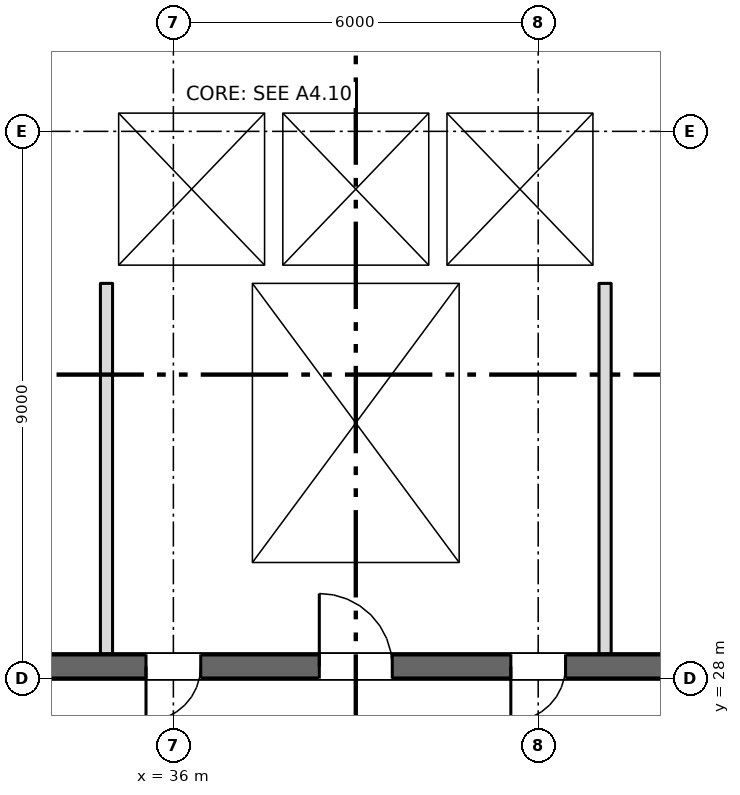
"""IFC4 building model, lengths in metres.
Left out: names, types, materials, properties, quantities, classifications, styles, units other than length and angle.
Written with IfcOpenShell. Run it as: python <this file> out.ifc"""

import sys

from ifc_helpers import new_model, si_unit, direction, frame, frame_2d, origin, place, context, subcontext, project, spatial, rectangle, extrude, element, fill, save


model = new_model("IFC4")
c1 = context("Model", 3, precision=1e-05, world=origin(), true_north=direction((0.0, 1.0)))
c2 = subcontext(c1, "Body", "Model", "MODEL_VIEW")
j1 = project(units=[si_unit("LENGTHUNIT", "METRE"), si_unit("PLANEANGLEUNIT", "RADIAN")], contexts=[c1])
p1 = place(None, origin())
s1 = spatial("IfcSite", under=j1, at=p1, CompositionType="ELEMENT")
p2 = place(p1, origin())
s2 = spatial("IfcBuilding", under=s1, at=p2, CompositionType="ELEMENT")
p3 = place(p2, frame((0.0, 0.0, 52.5)))
s3 = spatial("IfcBuildingStorey", under=s2, at=p3, CompositionType="ELEMENT", Elevation=52.5)
p4 = place(p3, frame((6.7, 28.2, 0.0), z_axis=(0.0, 0.0, 1.0), x_axis=(1.0, 0.0, 0.0)))
e1 = element("IfcWall", 1, at=p4, inside=s3, PredefinedType="SHEAR", context=c2, shape_type="SweptSolid", body=[
    extrude(rectangle(XDim=57.8, YDim=0.4, at=frame_2d((28.9, 0.0))), origin(), (0.0, 0.0, 1.0), 3.35),
])
p5 = place(p4, frame((13.85, 0.0, 0.0)))
e2 = element("IfcOpeningElement", 2, at=p5, cuts=e1, PredefinedType="OPENING", context=c2, shape_type="SweptSolid", body=[
    extrude(rectangle(XDim=0.9, YDim=2.1, at=frame_2d((0.45, 1.05))), frame((0.0, 0.21, 0.0), z_axis=(0.0, -1.0, 0.0), x_axis=(1.0, 0.0, 0.0)), (0.0, 0.0, 1.0), 0.42),
])
p6 = place(p4, frame((48.562, 0.0, 0.0)))
e3 = element("IfcOpeningElement", 3, at=p6, cuts=e1, PredefinedType="OPENING", context=c2, shape_type="SweptSolid", body=[
    extrude(rectangle(XDim=0.9, YDim=2.1, at=frame_2d((0.45, 1.05))), frame((0.0, 0.21, 0.0), z_axis=(0.0, -1.0, 0.0), x_axis=(1.0, 0.0, 0.0)), (0.0, 0.0, 1.0), 0.42),
])
p7 = place(p4, frame((51.137, 0.0, 0.0)))
e4 = element("IfcOpeningElement", 4, at=p7, cuts=e1, PredefinedType="OPENING", context=c2, shape_type="SweptSolid", body=[
    extrude(rectangle(XDim=0.9, YDim=2.1, at=frame_2d((0.45, 1.05))), frame((0.0, 0.21, 0.0), z_axis=(0.0, -1.0, 0.0), x_axis=(1.0, 0.0, 0.0)), (0.0, 0.0, 1.0), 0.42),
])
p8 = place(p4, frame((1.35, 0.0, 0.0)))
e5 = element("IfcOpeningElement", 5, at=p8, cuts=e1, PredefinedType="OPENING", context=c2, shape_type="SweptSolid", body=[
    extrude(rectangle(XDim=0.9, YDim=2.1, at=frame_2d((0.45, 1.05))), frame((0.0, 0.21, 0.0), z_axis=(0.0, -1.0, 0.0), x_axis=(1.0, 0.0, 0.0)), (0.0, 0.0, 1.0), 0.42),
])
p9 = place(p4, frame((4.7, 0.0, 0.0)))
e6 = element("IfcOpeningElement", 6, at=p9, cuts=e1, PredefinedType="OPENING", context=c2, shape_type="SweptSolid", body=[
    extrude(rectangle(XDim=1.2, YDim=2.1, at=frame_2d((0.6, 1.05))), frame((0.0, 0.21, 0.0), z_axis=(0.0, -1.0, 0.0), x_axis=(1.0, 0.0, 0.0)), (0.0, 0.0, 1.0), 0.42),
])
p10 = place(p4, frame((31.7, 0.0, 0.0)))
e7 = element("IfcOpeningElement", 7, at=p10, cuts=e1, PredefinedType="OPENING", context=c2, shape_type="SweptSolid", body=[
    extrude(rectangle(XDim=1.2, YDim=2.1, at=frame_2d((0.6, 1.05))), frame((0.0, 0.21, 0.0), z_axis=(0.0, -1.0, 0.0), x_axis=(1.0, 0.0, 0.0)), (0.0, 0.0, 1.0), 0.42),
])
p11 = place(p4, frame((55.2, 0.0, 0.0)))
e8 = element("IfcOpeningElement", 8, at=p11, cuts=e1, PredefinedType="OPENING", context=c2, shape_type="SweptSolid", body=[
    extrude(rectangle(XDim=1.2, YDim=2.1, at=frame_2d((0.6, 1.05))), frame((0.0, 0.21, 0.0), z_axis=(0.0, -1.0, 0.0), x_axis=(1.0, 0.0, 0.0)), (0.0, 0.0, 1.0), 0.42),
])
p12 = place(p4, frame((21.7, 0.0, 0.0)))
e9 = element("IfcOpeningElement", 9, at=p12, cuts=e1, PredefinedType="OPENING", context=c2, shape_type="SweptSolid", body=[
    extrude(rectangle(XDim=1.2, YDim=2.1, at=frame_2d((0.6, 1.05))), frame((0.0, 0.21, 0.0), z_axis=(0.0, -1.0, 0.0), x_axis=(1.0, 0.0, 0.0)), (0.0, 0.0, 1.0), 0.42),
])
p13 = place(p4, frame((41.7, 0.0, 0.0)))
e10 = element("IfcOpeningElement", 10, at=p13, cuts=e1, PredefinedType="OPENING", context=c2, shape_type="SweptSolid", body=[
    extrude(rectangle(XDim=1.2, YDim=2.1, at=frame_2d((0.6, 1.05))), frame((0.0, 0.21, 0.0), z_axis=(0.0, -1.0, 0.0), x_axis=(1.0, 0.0, 0.0)), (0.0, 0.0, 1.0), 0.42),
])
p14 = place(p4, frame((24.85, 0.0, 0.0)))
e11 = element("IfcOpeningElement", 11, at=p14, cuts=e1, PredefinedType="OPENING", context=c2, shape_type="SweptSolid", body=[
    extrude(rectangle(XDim=2.4, YDim=2.1, at=frame_2d((1.2, 1.05))), frame((0.0, 0.21, 0.0), z_axis=(0.0, -1.0, 0.0), x_axis=(1.0, 0.0, 0.0)), (0.0, 0.0, 1.0), 0.42),
])
p15 = place(p4, frame((37.35, 0.0, 0.0)))
e12 = element("IfcOpeningElement", 12, at=p15, cuts=e1, PredefinedType="OPENING", context=c2, shape_type="SweptSolid", body=[
    extrude(rectangle(XDim=2.4, YDim=2.1, at=frame_2d((1.2, 1.05))), frame((0.0, 0.21, 0.0), z_axis=(0.0, -1.0, 0.0), x_axis=(1.0, 0.0, 0.0)), (0.0, 0.0, 1.0), 0.42),
])
p16 = place(p4, frame((7.85, 0.0, 0.0)))
e13 = element("IfcOpeningElement", 13, at=p16, cuts=e1, PredefinedType="OPENING", context=c2, shape_type="SweptSolid", body=[
    extrude(rectangle(XDim=2.4, YDim=2.1, at=frame_2d((1.2, 1.05))), frame((0.0, 0.21, 0.0), z_axis=(0.0, -1.0, 0.0), x_axis=(1.0, 0.0, 0.0)), (0.0, 0.0, 1.0), 0.42),
])
p17 = place(p4, frame((28.85, 0.0, 0.0)))
e14 = element("IfcOpeningElement", 14, at=p17, cuts=e1, PredefinedType="OPENING", context=c2, shape_type="SweptSolid", body=[
    extrude(rectangle(XDim=0.9, YDim=2.1, at=frame_2d((0.45, 1.05))), frame((0.0, 0.21, 0.0), z_axis=(0.0, -1.0, 0.0), x_axis=(1.0, 0.0, 0.0)), (0.0, 0.0, 1.0), 0.42),
])
p18 = place(p4, frame((34.85, 0.0, 0.0)))
e15 = element("IfcOpeningElement", 15, at=p18, cuts=e1, PredefinedType="OPENING", context=c2, shape_type="SweptSolid", body=[
    extrude(rectangle(XDim=0.9, YDim=2.1, at=frame_2d((0.45, 1.05))), frame((0.0, 0.21, 0.0), z_axis=(0.0, -1.0, 0.0), x_axis=(1.0, 0.0, 0.0)), (0.0, 0.0, 1.0), 0.42),
])
for number, where, z_axis, x_axis in (
    (16, (37.15, 28.4, 0.0), (0.0, 0.0, 1.0), (0.0, 1.0, 0.0)),
    (17, (40.85, 28.4, 0.0), (0.0, 0.0, 1.0), (0.0, 1.0, 0.0)),
):
    element("IfcWall", number, at=place(p3, frame(where, z_axis=z_axis, x_axis=x_axis)), inside=s3, PredefinedType="SHEAR", context=c2, shape_type="SweptSolid", body=[
        extrude(rectangle(XDim=6.1, YDim=0.3, at=frame_2d((3.05, 0.0))), origin(), (0.0, 0.0, 1.0), 3.35),
    ])
p19 = place(p3, frame((34.8, 34.65, 0.0), z_axis=(0.0, 0.0, 1.0), x_axis=(1.0, 0.0, 0.0)))
e18 = element("IfcWall", 18, at=p19, inside=s3, PredefinedType="SHEAR", context=c2, shape_type="SweptSolid", body=[
    extrude(rectangle(XDim=8.4, YDim=0.3, at=frame_2d((4.2, 0.0))), origin(), (0.0, 0.0, 1.0), 3.35),
])
p20 = place(p3, frame((34.8, 37.45, 0.0), z_axis=(0.0, 0.0, 1.0), x_axis=(1.0, 0.0, 0.0)))
e19 = element("IfcWall", 19, at=p20, inside=s3, PredefinedType="SHEAR", context=c2, shape_type="SweptSolid", body=[
    extrude(rectangle(XDim=8.4, YDim=0.3, at=frame_2d((4.2, 0.0))), origin(), (0.0, 0.0, 1.0), 3.35),
])
p21 = place(p20, frame((0.95, 0.0, 0.0)))
e20 = element("IfcOpeningElement", 20, at=p21, cuts=e19, PredefinedType="OPENING", context=c2, shape_type="SweptSolid", body=[
    extrude(rectangle(XDim=1.1, YDim=2.1, at=frame_2d((0.55, 1.05))), frame((0.0, 0.16, 0.0), z_axis=(0.0, -1.0, 0.0), x_axis=(1.0, 0.0, 0.0)), (0.0, 0.0, 1.0), 0.32),
])
p22 = place(p20, frame((3.65, 0.0, 0.0)))
e21 = element("IfcOpeningElement", 21, at=p22, cuts=e19, PredefinedType="OPENING", context=c2, shape_type="SweptSolid", body=[
    extrude(rectangle(XDim=1.1, YDim=2.1, at=frame_2d((0.55, 1.05))), frame((0.0, 0.16, 0.0), z_axis=(0.0, -1.0, 0.0), x_axis=(1.0, 0.0, 0.0)), (0.0, 0.0, 1.0), 0.32),
])
p23 = place(p20, frame((6.35, 0.0, 0.0)))
e22 = element("IfcOpeningElement", 22, at=p23, cuts=e19, PredefinedType="OPENING", context=c2, shape_type="SweptSolid", body=[
    extrude(rectangle(XDim=1.1, YDim=2.1, at=frame_2d((0.55, 1.05))), frame((0.0, 0.16, 0.0), z_axis=(0.0, -1.0, 0.0), x_axis=(1.0, 0.0, 0.0)), (0.0, 0.0, 1.0), 0.32),
])
for number, where, z_axis, x_axis in (
    (23, (34.95, 34.8, 0.0), (0.0, 0.0, 1.0), (0.0, 1.0, 0.0)),
    (24, (43.05, 34.8, 0.0), (0.0, 0.0, 1.0), (0.0, 1.0, 0.0)),
    (25, (37.65, 34.8, 0.0), (0.0, 0.0, 1.0), (0.0, 1.0, 0.0)),
    (26, (40.35, 34.8, 0.0), (0.0, 0.0, 1.0), (0.0, 1.0, 0.0)),
):
    element("IfcWall", number, at=place(p3, frame(where, z_axis=z_axis, x_axis=x_axis)), inside=s3, PredefinedType="SHEAR", context=c2, shape_type="SweptSolid", body=[
        extrude(rectangle(XDim=2.5, YDim=0.3, at=frame_2d((1.25, 0.0))), origin(), (0.0, 0.0, 1.0), 3.35),
    ])
for number, where, z_axis, x_axis in (
    (27, (34.9, 28.4, 0.0), (0.0, 0.0, 1.0), (0.0, 1.0, 0.0)),
    (28, (43.1, 28.4, 0.0), (0.0, 0.0, 1.0), (0.0, 1.0, 0.0)),
):
    element("IfcWall", number, at=place(p3, frame(where, z_axis=z_axis, x_axis=x_axis)), inside=s3, PredefinedType="PARTITIONING", context=c2, shape_type="SweptSolid", body=[
        extrude(rectangle(XDim=6.1, YDim=0.2, at=frame_2d((3.05, 0.0))), origin(), (0.0, 0.0, 1.0), 3.35),
    ])
p24 = place(p21, origin())
e29 = element("IfcDoor", 29, at=p24, inside=s3, OperationType="SLIDING_TO_LEFT", PredefinedType="DOOR", context=c2, shape_type="SweptSolid", body=[
    extrude(rectangle(XDim=1.1, YDim=2.1, at=frame_2d((0.55, 1.05))), frame((0.0, 0.025, 0.0), z_axis=(0.0, -1.0, 0.0), x_axis=(1.0, 0.0, 0.0)), (0.0, 0.0, 1.0), 0.05),
])
fill(e20, e29)
p25 = place(p22, origin())
e30 = element("IfcDoor", 30, at=p25, inside=s3, OperationType="SLIDING_TO_LEFT", PredefinedType="DOOR", context=c2, shape_type="SweptSolid", body=[
    extrude(rectangle(XDim=1.1, YDim=2.1, at=frame_2d((0.55, 1.05))), frame((0.0, 0.025, 0.0), z_axis=(0.0, -1.0, 0.0), x_axis=(1.0, 0.0, 0.0)), (0.0, 0.0, 1.0), 0.05),
])
fill(e21, e30)
p26 = place(p23, origin())
e31 = element("IfcDoor", 31, at=p26, inside=s3, OperationType="SLIDING_TO_LEFT", PredefinedType="DOOR", context=c2, shape_type="SweptSolid", body=[
    extrude(rectangle(XDim=1.1, YDim=2.1, at=frame_2d((0.55, 1.05))), frame((0.0, 0.025, 0.0), z_axis=(0.0, -1.0, 0.0), x_axis=(1.0, 0.0, 0.0)), (0.0, 0.0, 1.0), 0.05),
])
fill(e22, e31)
p27 = place(p10, origin())
e32 = element("IfcDoor", 32, at=p27, inside=s3, OperationType="SINGLE_SWING_LEFT", PredefinedType="DOOR", context=c2, shape_type="SweptSolid", body=[
    extrude(rectangle(XDim=1.2, YDim=2.1, at=frame_2d((0.6, 1.05))), frame((0.0, 0.025, 0.0), z_axis=(0.0, -1.0, 0.0), x_axis=(1.0, 0.0, 0.0)), (0.0, 0.0, 1.0), 0.05),
])
fill(e7, e32)
p28 = place(p17, origin())
e33 = element("IfcDoor", 33, at=p28, inside=s3, OperationType="SINGLE_SWING_LEFT", PredefinedType="DOOR", context=c2, shape_type="SweptSolid", body=[
    extrude(rectangle(XDim=0.9, YDim=2.1, at=frame_2d((0.45, 1.05))), frame((0.0, 0.025, 0.0), z_axis=(0.0, -1.0, 0.0), x_axis=(1.0, 0.0, 0.0)), (0.0, 0.0, 1.0), 0.05),
])
fill(e14, e33)
p29 = place(p18, origin())
e34 = element("IfcDoor", 34, at=p29, inside=s3, OperationType="SINGLE_SWING_LEFT", PredefinedType="DOOR", context=c2, shape_type="SweptSolid", body=[
    extrude(rectangle(XDim=0.9, YDim=2.1, at=frame_2d((0.45, 1.05))), frame((0.0, 0.025, 0.0), z_axis=(0.0, -1.0, 0.0), x_axis=(1.0, 0.0, 0.0)), (0.0, 0.0, 1.0), 0.05),
])
fill(e15, e34)
save(model, sys.argv[1])
